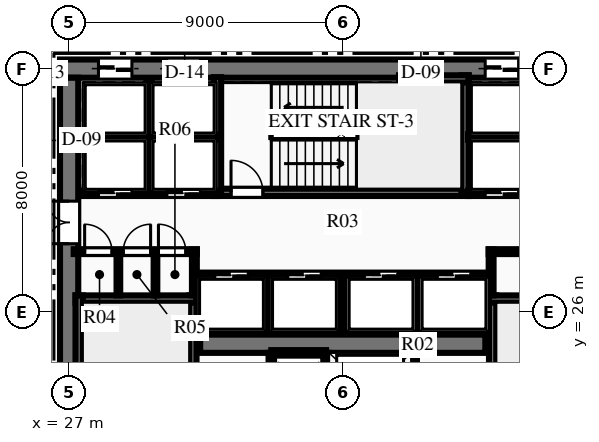
"""IFC4 building model, lengths in metres.
Left out: names, types, materials, properties, quantities, classifications, styles, units other than length and angle.
Written with IfcOpenShell. Run it as: python <this file> out.ifc"""

import sys

from ifc_helpers import new_model, si_unit, direction, frame, frame_2d, origin, place, context, subcontext, project, spatial, rectangle, extrude, element, fill, save


model = new_model("IFC4")
c1 = context("Model", 3, precision=1e-05, world=origin(), true_north=direction((0.0, 1.0)))
c2 = subcontext(c1, "Body", "Model", "MODEL_VIEW")
j1 = project(units=[si_unit("LENGTHUNIT", "METRE"), si_unit("PLANEANGLEUNIT", "RADIAN")], contexts=[c1])
p1 = place(None, origin())
s1 = spatial("IfcSite", under=j1, at=p1, CompositionType="ELEMENT")
p2 = place(p1, origin())
s2 = spatial("IfcBuilding", under=s1, at=p2, CompositionType="ELEMENT")
p3 = place(p2, frame((0.0, 0.0, 47.7)))
s3 = spatial("IfcBuildingStorey", under=s2, at=p3, CompositionType="ELEMENT", Elevation=47.7)
p4 = place(p3, frame((26.7, 34.0, 0.0), z_axis=(0.0, 0.0, 1.0), x_axis=(1.0, 0.0, 0.0)))
e1 = element("IfcWall", 1, at=p4, inside=s3, PredefinedType="SHEAR", context=c2, shape_type="SweptSolid", body=[
    extrude(rectangle(XDim=18.6, YDim=0.6, at=frame_2d((9.3, 0.0))), origin(), (0.0, 0.0, 1.0), 3.75),
])
p5 = place(p4, frame((1.265, 0.0, 0.0)))
e2 = element("IfcOpeningElement", 2, at=p5, cuts=e1, PredefinedType="OPENING", context=c2, shape_type="SweptSolid", body=[
    extrude(rectangle(XDim=1.1, YDim=2.15, at=frame_2d((0.55, 1.075))), frame((0.0, 0.31, 0.0), z_axis=(0.0, -1.0, 0.0), x_axis=(1.0, 0.0, 0.0)), (0.0, 0.0, 1.0), 0.62),
])
p6 = place(p4, frame((3.515, 0.0, 0.0)))
e3 = element("IfcOpeningElement", 3, at=p6, cuts=e1, PredefinedType="OPENING", context=c2, shape_type="SweptSolid", body=[
    extrude(rectangle(XDim=1.1, YDim=2.15, at=frame_2d((0.55, 1.075))), frame((0.0, 0.31, 0.0), z_axis=(0.0, -1.0, 0.0), x_axis=(1.0, 0.0, 0.0)), (0.0, 0.0, 1.0), 0.62),
])
p7 = place(p4, frame((13.985, 0.0, 0.0)))
e4 = element("IfcOpeningElement", 4, at=p7, cuts=e1, PredefinedType="OPENING", context=c2, shape_type="SweptSolid", body=[
    extrude(rectangle(XDim=1.1, YDim=2.15, at=frame_2d((0.55, 1.075))), frame((0.0, 0.31, 0.0), z_axis=(0.0, -1.0, 0.0), x_axis=(1.0, 0.0, 0.0)), (0.0, 0.0, 1.0), 0.62),
])
p8 = place(p4, frame((16.235, 0.0, 0.0)))
e5 = element("IfcOpeningElement", 5, at=p8, cuts=e1, PredefinedType="OPENING", context=c2, shape_type="SweptSolid", body=[
    extrude(rectangle(XDim=1.1, YDim=2.15, at=frame_2d((0.55, 1.075))), frame((0.0, 0.31, 0.0), z_axis=(0.0, -1.0, 0.0), x_axis=(1.0, 0.0, 0.0)), (0.0, 0.0, 1.0), 0.62),
])
p9 = place(p3, frame((27.0, 18.3, 0.0), z_axis=(0.0, 0.0, 1.0), x_axis=(0.0, 1.0, 0.0)))
e6 = element("IfcWall", 6, at=p9, inside=s3, PredefinedType="SHEAR", context=c2, shape_type="SweptSolid", body=[
    extrude(rectangle(XDim=15.4, YDim=0.6, at=frame_2d((7.7, 0.0))), origin(), (0.0, 0.0, 1.0), 3.75),
])
p10 = place(p9, frame((9.94, 0.0, 0.0)))
e7 = element("IfcOpeningElement", 7, at=p10, cuts=e6, PredefinedType="OPENING", context=c2, shape_type="SweptSolid", body=[
    extrude(rectangle(XDim=1.4, YDim=2.2, at=frame_2d((0.7, 1.1))), frame((0.0, 0.31, 0.0), z_axis=(0.0, -1.0, 0.0), x_axis=(1.0, 0.0, 0.0)), (0.0, 0.0, 1.0), 0.62),
])
p11 = place(p3, frame((31.31, 24.95, 0.0), z_axis=(0.0, 0.0, 1.0), x_axis=(1.0, 0.0, 0.0)))
e8 = element("IfcWall", 8, at=p11, inside=s3, PredefinedType="SHEAR", context=c2, shape_type="SweptSolid", body=[
    extrude(rectangle(XDim=9.38, YDim=0.6, at=frame_2d((4.69, 0.0))), origin(), (0.0, 0.0, 1.0), 3.75),
])
p12 = place(p3, frame((31.07, 18.28, 0.0), z_axis=(0.0, 0.0, 1.0), x_axis=(0.0, 1.0, 0.0)))
e9 = element("IfcWall", 9, at=p12, inside=s3, PredefinedType="SHEAR", context=c2, shape_type="SweptSolid", body=[
    extrude(rectangle(XDim=8.26, YDim=0.24, at=frame_2d((4.13, 0.0))), origin(), (0.0, 0.0, 1.0), 3.75),
])
p13 = place(p12, frame((0.365, 0.0, 0.0)))
e10 = element("IfcOpeningElement", 10, at=p13, cuts=e9, PredefinedType="OPENING", context=c2, shape_type="SweptSolid", body=[
    extrude(rectangle(XDim=1.05, YDim=2.15, at=frame_2d((0.525, 1.075))), frame((0.0, 0.13, 0.0), z_axis=(0.0, -1.0, 0.0), x_axis=(1.0, 0.0, 0.0)), (0.0, 0.0, 1.0), 0.26),
])
p14 = place(p3, frame((27.21, 26.42, 0.0), z_axis=(0.0, 0.0, 1.0), x_axis=(1.0, 0.0, 0.0)))
e11 = element("IfcWall", 11, at=p14, inside=s3, PredefinedType="SHEAR", context=c2, shape_type="SweptSolid", body=[
    extrude(rectangle(XDim=3.98, YDim=0.24, at=frame_2d((1.99, 0.0))), origin(), (0.0, 0.0, 1.0), 3.75),
])
p15 = place(p3, frame((27.33, 18.28, 0.0), z_axis=(0.0, 0.0, 1.0), x_axis=(0.0, 1.0, 0.0)))
e12 = element("IfcWall", 12, at=p15, inside=s3, PredefinedType="SHEAR", context=c2, shape_type="SweptSolid", body=[
    extrude(rectangle(XDim=8.26, YDim=0.24, at=frame_2d((4.13, 0.0))), origin(), (0.0, 0.0, 1.0), 3.75),
])
p16 = place(p3, frame((40.93, 18.28, 0.0), z_axis=(0.0, 0.0, 1.0), x_axis=(0.0, 1.0, 0.0)))
e13 = element("IfcWall", 13, at=p16, inside=s3, PredefinedType="SHEAR", context=c2, shape_type="SweptSolid", body=[
    extrude(rectangle(XDim=8.26, YDim=0.24, at=frame_2d((4.13, 0.0))), origin(), (0.0, 0.0, 1.0), 3.75),
])
p17 = place(p16, frame((0.365, 0.0, 0.0)))
e14 = element("IfcOpeningElement", 14, at=p17, cuts=e13, PredefinedType="OPENING", context=c2, shape_type="SweptSolid", body=[
    extrude(rectangle(XDim=1.05, YDim=2.15, at=frame_2d((0.525, 1.075))), frame((0.0, 0.13, 0.0), z_axis=(0.0, -1.0, 0.0), x_axis=(1.0, 0.0, 0.0)), (0.0, 0.0, 1.0), 0.26),
])
p18 = place(p3, frame((40.81, 26.42, 0.0), z_axis=(0.0, 0.0, 1.0), x_axis=(1.0, 0.0, 0.0)))
e15 = element("IfcWall", 15, at=p18, inside=s3, PredefinedType="SHEAR", context=c2, shape_type="SweptSolid", body=[
    extrude(rectangle(XDim=3.98, YDim=0.24, at=frame_2d((1.99, 0.0))), origin(), (0.0, 0.0, 1.0), 3.75),
])
p19 = place(p3, frame((31.76, 29.93, 0.0), z_axis=(0.0, 0.0, 1.0), x_axis=(1.0, 0.0, 0.0)))
e16 = element("IfcWall", 16, at=p19, inside=s3, PredefinedType="SHEAR", context=c2, shape_type="SweptSolid", body=[
    extrude(rectangle(XDim=8.38, YDim=0.24, at=frame_2d((4.19, 0.0))), origin(), (0.0, 0.0, 1.0), 3.75),
])
p20 = place(p19, frame((0.565, 0.0, 0.0)))
e17 = element("IfcOpeningElement", 17, at=p20, cuts=e16, PredefinedType="OPENING", context=c2, shape_type="SweptSolid", body=[
    extrude(rectangle(XDim=1.05, YDim=2.15, at=frame_2d((0.525, 1.075))), frame((0.0, 0.13, 0.0), z_axis=(0.0, -1.0, 0.0), x_axis=(1.0, 0.0, 0.0)), (0.0, 0.0, 1.0), 0.26),
])
p21 = place(p3, frame((31.88, 29.93, 0.0), z_axis=(0.0, 0.0, 1.0), x_axis=(0.0, 1.0, 0.0)))
e18 = element("IfcWall", 18, at=p21, inside=s3, PredefinedType="SHEAR", context=c2, shape_type="SweptSolid", body=[
    extrude(rectangle(XDim=3.79, YDim=0.24, at=frame_2d((1.895, 0.0))), origin(), (0.0, 0.0, 1.0), 3.75),
])
p22 = place(p3, frame((40.02, 29.93, 0.0), z_axis=(0.0, 0.0, 1.0), x_axis=(0.0, 1.0, 0.0)))
e19 = element("IfcWall", 19, at=p22, inside=s3, PredefinedType="SHEAR", context=c2, shape_type="SweptSolid", body=[
    extrude(rectangle(XDim=3.85, YDim=0.24, at=frame_2d((1.925, 0.0))), origin(), (0.0, 0.0, 1.0), 3.75),
])
p23 = place(p3, frame((37.85, 33.66, 0.0), z_axis=(0.0, 0.0, 1.0), x_axis=(1.0, 0.0, 0.0)))
e20 = element("IfcWall", 20, at=p23, inside=s3, PredefinedType="SHEAR", context=c2, shape_type="SweptSolid", body=[
    extrude(rectangle(XDim=2.29, YDim=0.24, at=frame_2d((1.145, 0.0))), origin(), (0.0, 0.0, 1.0), 3.75),
])
for number, where, z_axis, x_axis in (
    (21, (33.65, 22.05, 0.0), (0.0, 0.0, 1.0), (0.0, 1.0, 0.0)),
    (22, (35.45, 22.05, 0.0), (0.0, 0.0, 1.0), (0.0, 1.0, 0.0)),
):
    element("IfcWall", number, at=place(p3, frame(where, z_axis=z_axis, x_axis=x_axis)), inside=s3, PredefinedType="PARTITIONING", context=c2, shape_type="SweptSolid", body=[
        extrude(rectangle(XDim=2.6, YDim=0.18, at=frame_2d((1.3, 0.0))), origin(), (0.0, 0.0, 1.0), 3.44),
    ])
p24 = place(p3, frame((33.65, 24.65, 0.0), z_axis=(0.0, 0.0, 1.0), x_axis=(1.0, 0.0, 0.0)))
e23 = element("IfcWall", 23, at=p24, inside=s3, PredefinedType="PARTITIONING", context=c2, shape_type="SweptSolid", body=[
    extrude(rectangle(XDim=1.8, YDim=0.18, at=frame_2d((0.9, 0.0))), origin(), (0.0, 0.0, 1.0), 3.44),
])
p25 = place(p3, frame((38.35, 22.05, 0.0), z_axis=(0.0, 0.0, 1.0), x_axis=(0.0, 1.0, 0.0)))
e24 = element("IfcWall", 24, at=p25, inside=s3, PredefinedType="PARTITIONING", context=c2, shape_type="SweptSolid", body=[
    extrude(rectangle(XDim=2.6, YDim=0.18, at=frame_2d((1.3, 0.0))), origin(), (0.0, 0.0, 1.0), 3.44),
])
p26 = place(p3, frame((27.15, 27.98, 0.0), z_axis=(0.0, 0.0, 1.0), x_axis=(1.0, 0.0, 0.0)))
e25 = element("IfcWall", 25, at=p26, inside=s3, PredefinedType="PARTITIONING", context=c2, shape_type="SweptSolid", body=[
    extrude(rectangle(XDim=4.05, YDim=0.16, at=frame_2d((2.025, 0.0))), origin(), (0.0, 0.0, 1.0), 3.44),
])
p27 = place(p26, frame((0.36, 0.0, 0.0)))
e26 = element("IfcOpeningElement", 26, at=p27, cuts=e25, PredefinedType="OPENING", context=c2, shape_type="SweptSolid", body=[
    extrude(rectangle(XDim=0.9, YDim=2.15, at=frame_2d((0.45, 1.075))), frame((0.0, 0.09, 0.0), z_axis=(0.0, -1.0, 0.0), x_axis=(1.0, 0.0, 0.0)), (0.0, 0.0, 1.0), 0.18),
])
p28 = place(p26, frame((1.63, 0.0, 0.0)))
e27 = element("IfcOpeningElement", 27, at=p28, cuts=e25, PredefinedType="OPENING", context=c2, shape_type="SweptSolid", body=[
    extrude(rectangle(XDim=0.9, YDim=2.15, at=frame_2d((0.45, 1.075))), frame((0.0, 0.09, 0.0), z_axis=(0.0, -1.0, 0.0), x_axis=(1.0, 0.0, 0.0)), (0.0, 0.0, 1.0), 0.18),
])
p29 = place(p26, frame((2.788, 0.0, 0.0)))
e28 = element("IfcOpeningElement", 28, at=p29, cuts=e25, PredefinedType="OPENING", context=c2, shape_type="SweptSolid", body=[
    extrude(rectangle(XDim=0.9, YDim=2.15, at=frame_2d((0.45, 1.075))), frame((0.0, 0.09, 0.0), z_axis=(0.0, -1.0, 0.0), x_axis=(1.0, 0.0, 0.0)), (0.0, 0.0, 1.0), 0.18),
])
p30 = place(p3, frame((31.12, 26.54, 0.0), z_axis=(0.0, 0.0, 1.0), x_axis=(0.0, 1.0, 0.0)))
e29 = element("IfcWall", 29, at=p30, inside=s3, PredefinedType="PARTITIONING", context=c2, shape_type="SweptSolid", body=[
    extrude(rectangle(XDim=1.51, YDim=0.16, at=frame_2d((0.755, 0.0))), origin(), (0.0, 0.0, 1.0), 3.44),
])
p31 = place(p3, frame((40.8, 27.98, 0.0), z_axis=(0.0, 0.0, 1.0), x_axis=(1.0, 0.0, 0.0)))
e30 = element("IfcWall", 30, at=p31, inside=s3, PredefinedType="PARTITIONING", context=c2, shape_type="SweptSolid", body=[
    extrude(rectangle(XDim=4.05, YDim=0.16, at=frame_2d((2.025, 0.0))), origin(), (0.0, 0.0, 1.0), 3.44),
])
p32 = place(p31, frame((1.475, 0.0, 0.0)))
e31 = element("IfcOpeningElement", 31, at=p32, cuts=e30, PredefinedType="OPENING", context=c2, shape_type="SweptSolid", body=[
    extrude(rectangle(XDim=0.95, YDim=2.15, at=frame_2d((0.475, 1.075))), frame((0.0, 0.09, 0.0), z_axis=(0.0, -1.0, 0.0), x_axis=(1.0, 0.0, 0.0)), (0.0, 0.0, 1.0), 0.18),
])
p33 = place(p3, frame((40.88, 26.54, 0.0), z_axis=(0.0, 0.0, 1.0), x_axis=(0.0, 1.0, 0.0)))
e32 = element("IfcWall", 32, at=p33, inside=s3, PredefinedType="PARTITIONING", context=c2, shape_type="SweptSolid", body=[
    extrude(rectangle(XDim=1.51, YDim=0.16, at=frame_2d((0.755, 0.0))), origin(), (0.0, 0.0, 1.0), 3.44),
])
for number, where, z_axis, x_axis in (
    (33, (28.62, 26.54, 0.0), (0.0, 0.0, 1.0), (0.0, 1.0, 0.0)),
    (34, (29.84, 26.54, 0.0), (0.0, 0.0, 1.0), (0.0, 1.0, 0.0)),
):
    element("IfcWall", number, at=place(p3, frame(where, z_axis=z_axis, x_axis=x_axis)), inside=s3, PredefinedType="PARTITIONING", context=c2, shape_type="SweptSolid", body=[
        extrude(rectangle(XDim=1.44, YDim=0.12, at=frame_2d((0.72, 0.0))), origin(), (0.0, 0.0, 1.0), 3.44),
    ])
p34 = place(p3, frame((27.45, 29.9, 0.0), z_axis=(0.0, 0.0, 1.0), x_axis=(1.0, 0.0, 0.0)))
e35 = element("IfcWall", 35, at=p34, inside=s3, PredefinedType="PARTITIONING", context=c2, shape_type="SweptSolid", body=[
    extrude(rectangle(XDim=4.43, YDim=0.18, at=frame_2d((2.215, 0.0))), origin(), (0.0, 0.0, 1.0), 3.44),
])
p35 = place(p34, frame((0.515, 0.0, 0.0)))
e36 = element("IfcOpeningElement", 36, at=p35, cuts=e35, PredefinedType="OPENING", context=c2, shape_type="SweptSolid", body=[
    extrude(rectangle(XDim=1.1, YDim=2.15, at=frame_2d((0.55, 1.075))), frame((0.0, 0.1, 0.0), z_axis=(0.0, -1.0, 0.0), x_axis=(1.0, 0.0, 0.0)), (0.0, 0.0, 1.0), 0.2),
])
p36 = place(p34, frame((2.765, 0.0, 0.0)))
e37 = element("IfcOpeningElement", 37, at=p36, cuts=e35, PredefinedType="OPENING", context=c2, shape_type="SweptSolid", body=[
    extrude(rectangle(XDim=1.1, YDim=2.15, at=frame_2d((0.55, 1.075))), frame((0.0, 0.1, 0.0), z_axis=(0.0, -1.0, 0.0), x_axis=(1.0, 0.0, 0.0)), (0.0, 0.0, 1.0), 0.2),
])
p37 = place(p3, frame((27.45, 31.75, 0.0), z_axis=(0.0, 0.0, 1.0), x_axis=(1.0, 0.0, 0.0)))
e38 = element("IfcWall", 38, at=p37, inside=s3, PredefinedType="PARTITIONING", context=c2, shape_type="SweptSolid", body=[
    extrude(rectangle(XDim=4.43, YDim=0.18, at=frame_2d((2.215, 0.0))), origin(), (0.0, 0.0, 1.0), 3.44),
])
p38 = place(p3, frame((29.63, 29.9, 0.0), z_axis=(0.0, 0.0, 1.0), x_axis=(0.0, 1.0, 0.0)))
e39 = element("IfcWall", 39, at=p38, inside=s3, PredefinedType="PARTITIONING", context=c2, shape_type="SweptSolid", body=[
    extrude(rectangle(XDim=3.75, YDim=0.18, at=frame_2d((1.875, 0.0))), origin(), (0.0, 0.0, 1.0), 3.44),
])
p39 = place(p3, frame((40.12, 29.9, 0.0), z_axis=(0.0, 0.0, 1.0), x_axis=(1.0, 0.0, 0.0)))
e40 = element("IfcWall", 40, at=p39, inside=s3, PredefinedType="PARTITIONING", context=c2, shape_type="SweptSolid", body=[
    extrude(rectangle(XDim=4.43, YDim=0.18, at=frame_2d((2.215, 0.0))), origin(), (0.0, 0.0, 1.0), 3.44),
])
p40 = place(p39, frame((0.565, 0.0, 0.0)))
e41 = element("IfcOpeningElement", 41, at=p40, cuts=e40, PredefinedType="OPENING", context=c2, shape_type="SweptSolid", body=[
    extrude(rectangle(XDim=1.1, YDim=2.15, at=frame_2d((0.55, 1.075))), frame((0.0, 0.1, 0.0), z_axis=(0.0, -1.0, 0.0), x_axis=(1.0, 0.0, 0.0)), (0.0, 0.0, 1.0), 0.2),
])
p41 = place(p39, frame((2.815, 0.0, 0.0)))
e42 = element("IfcOpeningElement", 42, at=p41, cuts=e40, PredefinedType="OPENING", context=c2, shape_type="SweptSolid", body=[
    extrude(rectangle(XDim=1.1, YDim=2.15, at=frame_2d((0.55, 1.075))), frame((0.0, 0.1, 0.0), z_axis=(0.0, -1.0, 0.0), x_axis=(1.0, 0.0, 0.0)), (0.0, 0.0, 1.0), 0.2),
])
p42 = place(p3, frame((40.12, 31.75, 0.0), z_axis=(0.0, 0.0, 1.0), x_axis=(1.0, 0.0, 0.0)))
e43 = element("IfcWall", 43, at=p42, inside=s3, PredefinedType="PARTITIONING", context=c2, shape_type="SweptSolid", body=[
    extrude(rectangle(XDim=4.43, YDim=0.18, at=frame_2d((2.215, 0.0))), origin(), (0.0, 0.0, 1.0), 3.44),
])
p43 = place(p3, frame((31.2, 27.2, 0.0), z_axis=(0.0, 0.0, 1.0), x_axis=(1.0, 0.0, 0.0)))
e44 = element("IfcWall", 44, at=p43, inside=s3, PredefinedType="PARTITIONING", context=c2, shape_type="SweptSolid", body=[
    extrude(rectangle(XDim=9.6, YDim=0.18, at=frame_2d((4.8, 0.0))), origin(), (0.0, 0.0, 1.0), 3.44),
])
p44 = place(p43, frame((0.59, 0.0, 0.0)))
e45 = element("IfcOpeningElement", 45, at=p44, cuts=e44, PredefinedType="OPENING", context=c2, shape_type="SweptSolid", body=[
    extrude(rectangle(XDim=1.1, YDim=2.15, at=frame_2d((0.55, 1.075))), frame((0.0, 0.1, 0.0), z_axis=(0.0, -1.0, 0.0), x_axis=(1.0, 0.0, 0.0)), (0.0, 0.0, 1.0), 0.2),
])
p45 = place(p43, frame((2.99, 0.0, 0.0)))
e46 = element("IfcOpeningElement", 46, at=p45, cuts=e44, PredefinedType="OPENING", context=c2, shape_type="SweptSolid", body=[
    extrude(rectangle(XDim=1.1, YDim=2.15, at=frame_2d((0.55, 1.075))), frame((0.0, 0.1, 0.0), z_axis=(0.0, -1.0, 0.0), x_axis=(1.0, 0.0, 0.0)), (0.0, 0.0, 1.0), 0.2),
])
p46 = place(p43, frame((5.51, 0.0, 0.0)))
e47 = element("IfcOpeningElement", 47, at=p46, cuts=e44, PredefinedType="OPENING", context=c2, shape_type="SweptSolid", body=[
    extrude(rectangle(XDim=1.1, YDim=2.15, at=frame_2d((0.55, 1.075))), frame((0.0, 0.1, 0.0), z_axis=(0.0, -1.0, 0.0), x_axis=(1.0, 0.0, 0.0)), (0.0, 0.0, 1.0), 0.2),
])
p47 = place(p43, frame((7.91, 0.0, 0.0)))
e48 = element("IfcOpeningElement", 48, at=p47, cuts=e44, PredefinedType="OPENING", context=c2, shape_type="SweptSolid", body=[
    extrude(rectangle(XDim=1.1, YDim=2.15, at=frame_2d((0.55, 1.075))), frame((0.0, 0.1, 0.0), z_axis=(0.0, -1.0, 0.0), x_axis=(1.0, 0.0, 0.0)), (0.0, 0.0, 1.0), 0.2),
])
for number, where, z_axis, x_axis in (
    (49, (33.54, 25.3, 0.0), (0.0, 0.0, 1.0), (0.0, 1.0, 0.0)),
    (50, (36.0, 25.3, 0.0), (0.0, 0.0, 1.0), (0.0, 1.0, 0.0)),
    (51, (38.46, 25.3, 0.0), (0.0, 0.0, 1.0), (0.0, 1.0, 0.0)),
):
    element("IfcWall", number, at=place(p3, frame(where, z_axis=z_axis, x_axis=x_axis)), inside=s3, PredefinedType="PARTITIONING", context=c2, shape_type="SweptSolid", body=[
        extrude(rectangle(XDim=1.9, YDim=0.18, at=frame_2d((0.95, 0.0))), origin(), (0.0, 0.0, 1.0), 3.44),
    ])
p48 = place(p27, origin())
e52 = element("IfcDoor", 52, at=p48, inside=s3, OperationType="SINGLE_SWING_LEFT", PredefinedType="DOOR", context=c2, shape_type="SweptSolid", body=[
    extrude(rectangle(XDim=0.9, YDim=2.15, at=frame_2d((0.45, 1.075))), frame((0.0, 0.025, 0.0), z_axis=(0.0, -1.0, 0.0), x_axis=(1.0, 0.0, 0.0)), (0.0, 0.0, 1.0), 0.05),
])
fill(e26, e52)
p49 = place(p28, origin())
e53 = element("IfcDoor", 53, at=p49, inside=s3, OperationType="SINGLE_SWING_RIGHT", PredefinedType="DOOR", context=c2, shape_type="SweptSolid", body=[
    extrude(rectangle(XDim=0.9, YDim=2.15, at=frame_2d((0.45, 1.075))), frame((0.0, 0.025, 0.0), z_axis=(0.0, -1.0, 0.0), x_axis=(1.0, 0.0, 0.0)), (0.0, 0.0, 1.0), 0.05),
])
fill(e27, e53)
p50 = place(p29, origin())
e54 = element("IfcDoor", 54, at=p50, inside=s3, OperationType="SINGLE_SWING_LEFT", PredefinedType="DOOR", context=c2, shape_type="SweptSolid", body=[
    extrude(rectangle(XDim=0.9, YDim=2.15, at=frame_2d((0.45, 1.075))), frame((0.0, 0.025, 0.0), z_axis=(0.0, -1.0, 0.0), x_axis=(1.0, 0.0, 0.0)), (0.0, 0.0, 1.0), 0.05),
])
fill(e28, e54)
p51 = place(p20, origin())
e55 = element("IfcDoor", 55, at=p51, inside=s3, OperationType="SINGLE_SWING_LEFT", PredefinedType="DOOR", context=c2, shape_type="SweptSolid", body=[
    extrude(rectangle(XDim=1.05, YDim=2.15, at=frame_2d((0.525, 1.075))), frame((0.0, 0.025, 0.0), z_axis=(0.0, -1.0, 0.0), x_axis=(1.0, 0.0, 0.0)), (0.0, 0.0, 1.0), 0.05),
])
fill(e17, e55)
p52 = place(p10, origin())
e56 = element("IfcDoor", 56, at=p52, inside=s3, OperationType="DOUBLE_DOOR_SINGLE_SWING", PredefinedType="DOOR", context=c2, shape_type="SweptSolid", body=[
    extrude(rectangle(XDim=1.4, YDim=2.2, at=frame_2d((0.7, 1.1))), frame((0.0, 0.025, 0.0), z_axis=(0.0, -1.0, 0.0), x_axis=(1.0, 0.0, 0.0)), (0.0, 0.0, 1.0), 0.05),
])
fill(e7, e56)
p53 = place(p35, origin())
e57 = element("IfcDoor", 57, at=p53, inside=s3, OperationType="SLIDING_TO_LEFT", PredefinedType="DOOR", context=c2, shape_type="SweptSolid", body=[
    extrude(rectangle(XDim=1.1, YDim=2.15, at=frame_2d((0.55, 1.075))), frame((0.0, 0.025, 0.0), z_axis=(0.0, -1.0, 0.0), x_axis=(1.0, 0.0, 0.0)), (0.0, 0.0, 1.0), 0.05),
])
fill(e36, e57)
p54 = place(p36, origin())
e58 = element("IfcDoor", 58, at=p54, inside=s3, OperationType="SLIDING_TO_LEFT", PredefinedType="DOOR", context=c2, shape_type="SweptSolid", body=[
    extrude(rectangle(XDim=1.1, YDim=2.15, at=frame_2d((0.55, 1.075))), frame((0.0, 0.025, 0.0), z_axis=(0.0, -1.0, 0.0), x_axis=(1.0, 0.0, 0.0)), (0.0, 0.0, 1.0), 0.05),
])
fill(e37, e58)
p55 = place(p5, origin())
e59 = element("IfcDoor", 59, at=p55, inside=s3, OperationType="SLIDING_TO_LEFT", PredefinedType="DOOR", context=c2, shape_type="SweptSolid", body=[
    extrude(rectangle(XDim=1.1, YDim=2.15, at=frame_2d((0.55, 1.075))), frame((0.0, 0.025, 0.0), z_axis=(0.0, -1.0, 0.0), x_axis=(1.0, 0.0, 0.0)), (0.0, 0.0, 1.0), 0.05),
])
fill(e2, e59)
p56 = place(p6, origin())
e60 = element("IfcDoor", 60, at=p56, inside=s3, OperationType="SLIDING_TO_LEFT", PredefinedType="DOOR", context=c2, shape_type="SweptSolid", body=[
    extrude(rectangle(XDim=1.1, YDim=2.15, at=frame_2d((0.55, 1.075))), frame((0.0, 0.025, 0.0), z_axis=(0.0, -1.0, 0.0), x_axis=(1.0, 0.0, 0.0)), (0.0, 0.0, 1.0), 0.05),
])
fill(e3, e60)
p57 = place(p40, origin())
e61 = element("IfcDoor", 61, at=p57, inside=s3, OperationType="SLIDING_TO_LEFT", PredefinedType="DOOR", context=c2, shape_type="SweptSolid", body=[
    extrude(rectangle(XDim=1.1, YDim=2.15, at=frame_2d((0.55, 1.075))), frame((0.0, 0.025, 0.0), z_axis=(0.0, -1.0, 0.0), x_axis=(1.0, 0.0, 0.0)), (0.0, 0.0, 1.0), 0.05),
])
fill(e41, e61)
p58 = place(p7, origin())
e62 = element("IfcDoor", 62, at=p58, inside=s3, OperationType="SLIDING_TO_LEFT", PredefinedType="DOOR", context=c2, shape_type="SweptSolid", body=[
    extrude(rectangle(XDim=1.1, YDim=2.15, at=frame_2d((0.55, 1.075))), frame((0.0, 0.025, 0.0), z_axis=(0.0, -1.0, 0.0), x_axis=(1.0, 0.0, 0.0)), (0.0, 0.0, 1.0), 0.05),
])
fill(e4, e62)
p59 = place(p44, origin())
e63 = element("IfcDoor", 63, at=p59, inside=s3, OperationType="SLIDING_TO_LEFT", PredefinedType="DOOR", context=c2, shape_type="SweptSolid", body=[
    extrude(rectangle(XDim=1.1, YDim=2.15, at=frame_2d((0.55, 1.075))), frame((0.0, 0.025, 0.0), z_axis=(0.0, -1.0, 0.0), x_axis=(1.0, 0.0, 0.0)), (0.0, 0.0, 1.0), 0.05),
])
fill(e45, e63)
p60 = place(p45, origin())
e64 = element("IfcDoor", 64, at=p60, inside=s3, OperationType="SLIDING_TO_LEFT", PredefinedType="DOOR", context=c2, shape_type="SweptSolid", body=[
    extrude(rectangle(XDim=1.1, YDim=2.15, at=frame_2d((0.55, 1.075))), frame((0.0, 0.025, 0.0), z_axis=(0.0, -1.0, 0.0), x_axis=(1.0, 0.0, 0.0)), (0.0, 0.0, 1.0), 0.05),
])
fill(e46, e64)
p61 = place(p46, origin())
e65 = element("IfcDoor", 65, at=p61, inside=s3, OperationType="SLIDING_TO_LEFT", PredefinedType="DOOR", context=c2, shape_type="SweptSolid", body=[
    extrude(rectangle(XDim=1.1, YDim=2.15, at=frame_2d((0.55, 1.075))), frame((0.0, 0.025, 0.0), z_axis=(0.0, -1.0, 0.0), x_axis=(1.0, 0.0, 0.0)), (0.0, 0.0, 1.0), 0.05),
])
fill(e47, e65)
p62 = place(p47, origin())
e66 = element("IfcDoor", 66, at=p62, inside=s3, OperationType="SLIDING_TO_LEFT", PredefinedType="DOOR", context=c2, shape_type="SweptSolid", body=[
    extrude(rectangle(XDim=1.1, YDim=2.15, at=frame_2d((0.55, 1.075))), frame((0.0, 0.025, 0.0), z_axis=(0.0, -1.0, 0.0), x_axis=(1.0, 0.0, 0.0)), (0.0, 0.0, 1.0), 0.05),
])
fill(e48, e66)
save(model, sys.argv[1])
